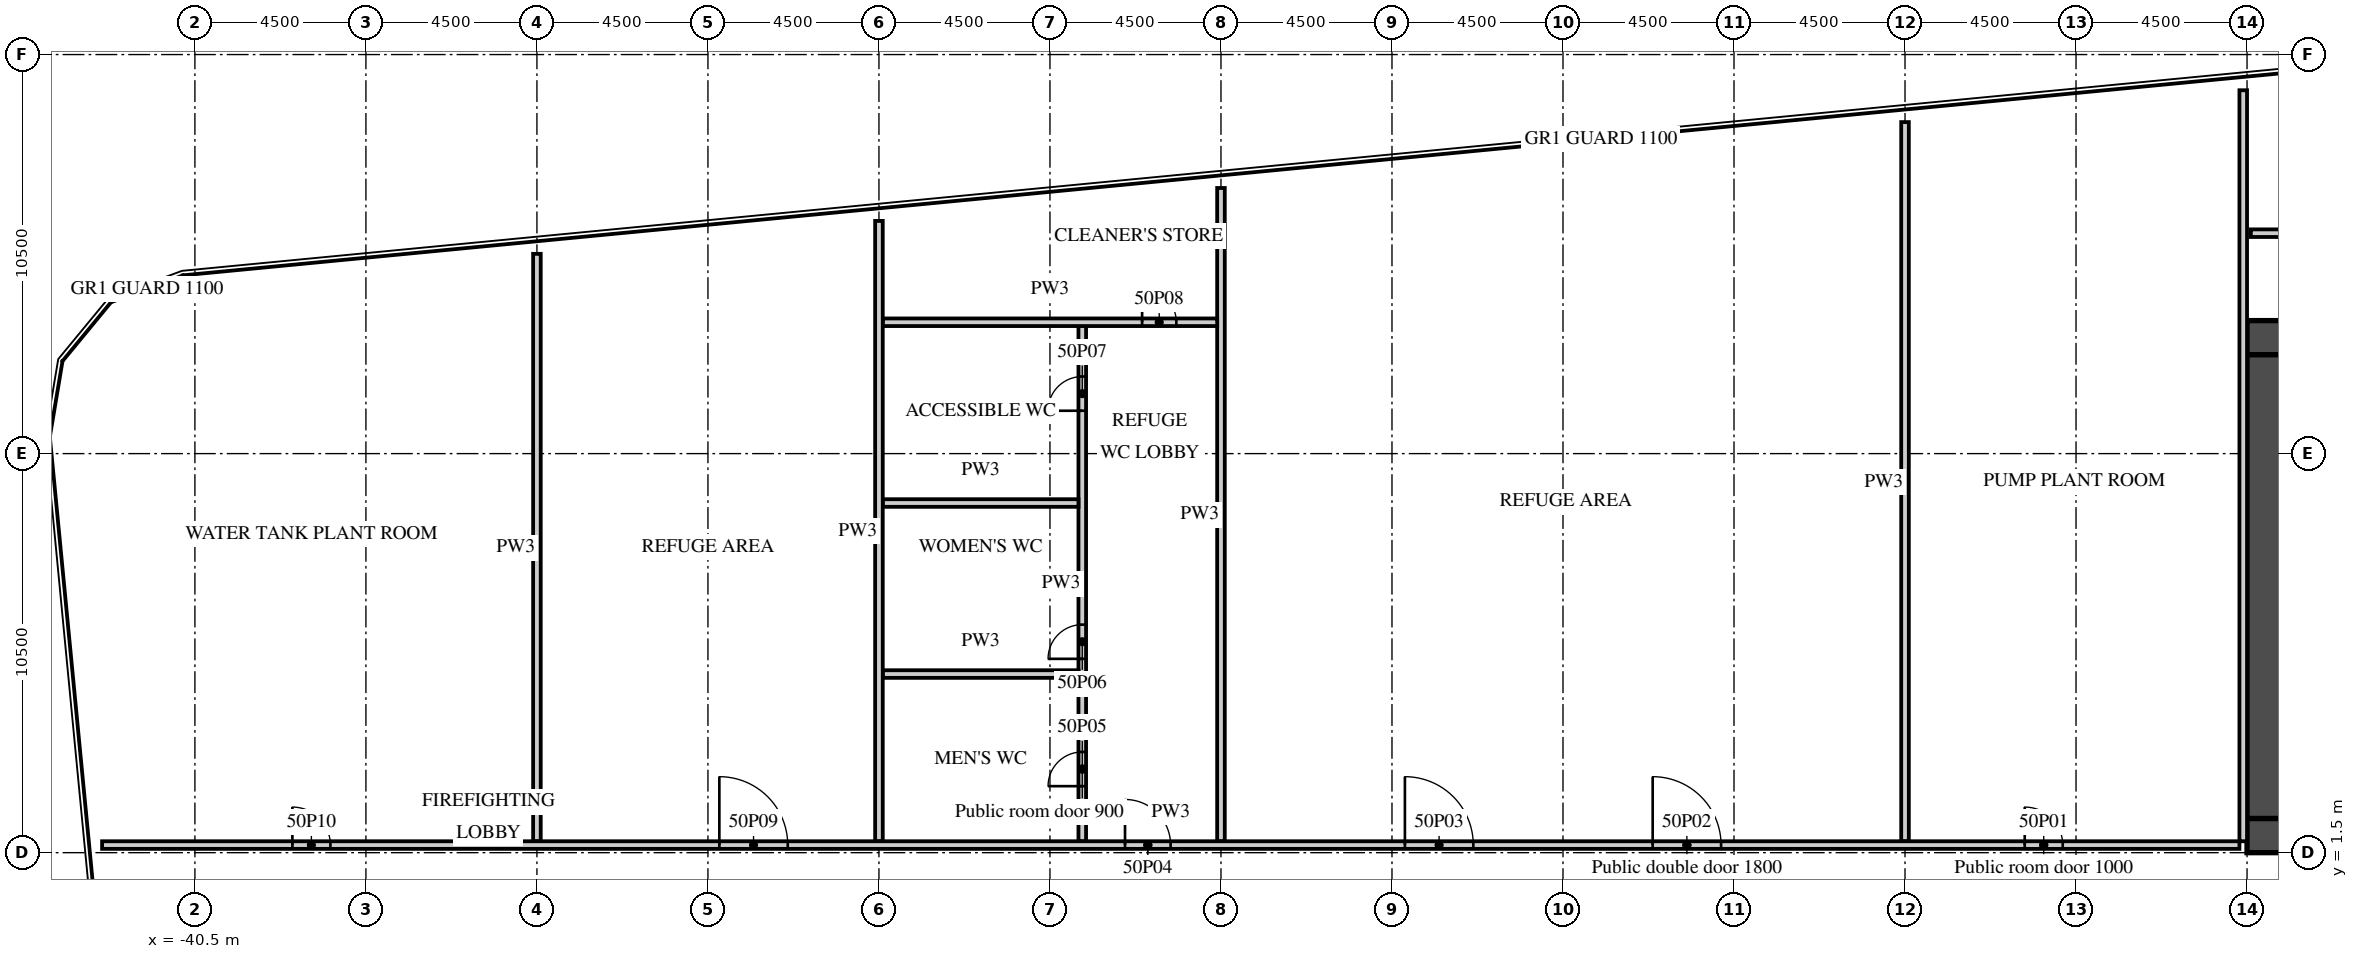
"""IFC4 building model, lengths in metres.
Left out: names, types, materials, properties, quantities, classifications, styles, units other than length and angle.
Written with IfcOpenShell. Run it as: python <this file> out.ifc"""

import sys

from ifc_helpers import new_model, si_unit, direction, frame, frame_2d, origin, place, context, subcontext, project, spatial, rectangle, extrude, element, fill, save


model = new_model("IFC4")
c1 = context("Model", 3, precision=1e-05, world=origin(), true_north=direction((0.0, 1.0)))
c2 = subcontext(c1, "Body", "Model", "MODEL_VIEW")
j1 = project(units=[si_unit("LENGTHUNIT", "METRE"), si_unit("PLANEANGLEUNIT", "RADIAN")], contexts=[c1])
p1 = place(None, origin())
s1 = spatial("IfcSite", under=j1, at=p1, CompositionType="ELEMENT")
p2 = place(p1, origin())
s2 = spatial("IfcBuilding", under=s1, at=p2, CompositionType="ELEMENT")
p3 = place(p2, frame((0.0, 0.0, 206.5)))
s3 = spatial("IfcBuildingStorey", under=s2, at=p3, CompositionType="ELEMENT", Elevation=206.5)
p4 = place(p3, frame((13.5, 1.95, 0.0), z_axis=(0.0, 0.0, 1.0), x_axis=(1.0, 0.0, 0.0)))
e1 = element("IfcWall", 1, at=p4, inside=s3, PredefinedType="SHEAR", context=c2, shape_type="SweptSolid", body=[
    extrude(rectangle(XDim=18.0, YDim=0.9, at=frame_2d((9.0, 0.0))), origin(), (0.0, 0.0, 1.0), 4.2),
])
p5 = place(p4, frame((1.475, 0.0, 0.0)))
e2 = element("IfcOpeningElement", 2, at=p5, cuts=e1, PredefinedType="OPENING", context=c2, shape_type="SweptSolid", body=[
    extrude(rectangle(XDim=1.8, YDim=2.1, at=frame_2d((0.9, 1.05))), frame((0.0, 0.46, 0.0), z_axis=(0.0, -1.0, 0.0), x_axis=(1.0, 0.0, 0.0)), (0.0, 0.0, 1.0), 0.92),
])
p6 = place(p3, frame((13.5, 15.05, 0.0), z_axis=(0.0, 0.0, 1.0), x_axis=(1.0, 0.0, 0.0)))
e3 = element("IfcWall", 3, at=p6, inside=s3, PredefinedType="SHEAR", context=c2, shape_type="SweptSolid", body=[
    extrude(rectangle(XDim=6.8, YDim=0.9, at=frame_2d((3.4, 0.0))), origin(), (0.0, 0.0, 1.0), 4.2),
])
p7 = place(p6, frame((4.725, 0.0, 0.0)))
e4 = element("IfcOpeningElement", 4, at=p7, cuts=e3, PredefinedType="OPENING", context=c2, shape_type="SweptSolid", body=[
    extrude(rectangle(XDim=1.2, YDim=2.1, at=frame_2d((0.6, 1.05))), frame((0.0, 0.46, 0.0), z_axis=(0.0, -1.0, 0.0), x_axis=(1.0, 0.0, 0.0)), (0.0, 0.0, 1.0), 0.92),
])
p8 = place(p3, frame((13.95, 2.4, 0.0), z_axis=(0.0, 0.0, 1.0), x_axis=(0.0, 1.0, 0.0)))
e5 = element("IfcWall", 5, at=p8, inside=s3, PredefinedType="SHEAR", context=c2, shape_type="SweptSolid", body=[
    extrude(rectangle(XDim=12.2, YDim=0.9, at=frame_2d((6.1, 0.0))), origin(), (0.0, 0.0, 1.0), 4.2),
])
p9 = place(p3, frame((13.6, 17.8, 0.0), z_axis=(0.0, 0.0, 1.0), x_axis=(1.0, 0.0, 0.0)))
e6 = element("IfcWall", 6, at=p9, inside=s3, PredefinedType="PARTITIONING", context=c2, shape_type="SweptSolid", body=[
    extrude(rectangle(XDim=24.378, YDim=0.2, at=frame_2d((12.189, 0.0))), origin(), (0.0, 0.0, 1.0), 4.2),
])
p10 = place(p9, frame((15.012, 0.0, 0.0)))
e7 = element("IfcOpeningElement", 7, at=p10, cuts=e6, PredefinedType="OPENING", context=c2, shape_type="SweptSolid", body=[
    extrude(rectangle(XDim=0.9, YDim=2.1, at=frame_2d((0.45, 1.05))), frame((0.0, 0.11, 0.0), z_axis=(0.0, -1.0, 0.0), x_axis=(1.0, 0.0, 0.0)), (0.0, 0.0, 1.0), 0.22),
])
p11 = place(p9, frame((6.712, 0.0, 0.0)))
e8 = element("IfcOpeningElement", 8, at=p11, cuts=e6, PredefinedType="OPENING", context=c2, shape_type="SweptSolid", body=[
    extrude(rectangle(XDim=0.9, YDim=2.1, at=frame_2d((0.45, 1.05))), frame((0.0, 0.11, 0.0), z_axis=(0.0, -1.0, 0.0), x_axis=(1.0, 0.0, 0.0)), (0.0, 0.0, 1.0), 0.22),
])
p12 = place(p3, frame((4.5, 1.8, 0.0), z_axis=(0.0, 0.0, 1.0), x_axis=(0.0, 1.0, 0.0)))
e9 = element("IfcWall", 9, at=p12, inside=s3, PredefinedType="PARTITIONING", context=c2, shape_type="SweptSolid", body=[
    extrude(rectangle(XDim=18.923, YDim=0.2, at=frame_2d((9.461, 0.0))), origin(), (0.0, 0.0, 1.0), 4.2),
])
p13 = place(p3, frame((-13.5, 1.8, 0.0), z_axis=(0.0, 0.0, 1.0), x_axis=(0.0, 1.0, 0.0)))
e10 = element("IfcWall", 10, at=p13, inside=s3, PredefinedType="PARTITIONING", context=c2, shape_type="SweptSolid", body=[
    extrude(rectangle(XDim=17.189, YDim=0.2, at=frame_2d((8.595, 0.0))), origin(), (0.0, 0.0, 1.0), 4.2),
])
p14 = place(p3, frame((-17.15, 1.8, 0.0), z_axis=(0.0, 0.0, 1.0), x_axis=(0.0, 1.0, 0.0)))
e11 = element("IfcWall", 11, at=p14, inside=s3, PredefinedType="PARTITIONING", context=c2, shape_type="SweptSolid", body=[
    extrude(rectangle(XDim=13.556, YDim=0.2, at=frame_2d((6.778, 0.0))), origin(), (0.0, 0.0, 1.0), 4.2),
])
p15 = place(p14, frame((1.45, 0.0, 0.0)))
e12 = element("IfcOpeningElement", 12, at=p15, cuts=e11, PredefinedType="OPENING", context=c2, shape_type="SweptSolid", body=[
    extrude(rectangle(XDim=0.9, YDim=2.1, at=frame_2d((0.45, 1.05))), frame((0.0, 0.11, 0.0), z_axis=(0.0, -1.0, 0.0), x_axis=(1.0, 0.0, 0.0)), (0.0, 0.0, 1.0), 0.22),
])
p16 = place(p14, frame((4.8, 0.0, 0.0)))
e13 = element("IfcOpeningElement", 13, at=p16, cuts=e11, PredefinedType="OPENING", context=c2, shape_type="SweptSolid", body=[
    extrude(rectangle(XDim=0.9, YDim=2.1, at=frame_2d((0.45, 1.05))), frame((0.0, 0.11, 0.0), z_axis=(0.0, -1.0, 0.0), x_axis=(1.0, 0.0, 0.0)), (0.0, 0.0, 1.0), 0.22),
])
p17 = place(p14, frame((11.328, 0.0, 0.0)))
e14 = element("IfcOpeningElement", 14, at=p17, cuts=e11, PredefinedType="OPENING", context=c2, shape_type="SweptSolid", body=[
    extrude(rectangle(XDim=0.9, YDim=2.1, at=frame_2d((0.45, 1.05))), frame((0.0, 0.11, 0.0), z_axis=(0.0, -1.0, 0.0), x_axis=(1.0, 0.0, 0.0)), (0.0, 0.0, 1.0), 0.22),
])
for number, where, z_axis, x_axis in (
    (15, (-22.4, 6.2, 0.0), (0.0, 0.0, 1.0), (1.0, 0.0, 0.0)),
    (16, (-22.4, 10.7, 0.0), (0.0, 0.0, 1.0), (1.0, 0.0, 0.0)),
):
    element("IfcWall", number, at=place(p3, frame(where, z_axis=z_axis, x_axis=x_axis)), inside=s3, PredefinedType="PARTITIONING", context=c2, shape_type="SweptSolid", body=[
        extrude(rectangle(XDim=5.15, YDim=0.2, at=frame_2d((2.575, 0.0))), origin(), (0.0, 0.0, 1.0), 4.2),
    ])
p18 = place(p3, frame((-22.4, 15.456, 0.0), z_axis=(0.0, 0.0, 1.0), x_axis=(1.0, 0.0, 0.0)))
e17 = element("IfcWall", 17, at=p18, inside=s3, PredefinedType="PARTITIONING", context=c2, shape_type="SweptSolid", body=[
    extrude(rectangle(XDim=8.8, YDim=0.2, at=frame_2d((4.4, 0.0))), origin(), (0.0, 0.0, 1.0), 4.2),
])
p19 = place(p18, frame((6.825, 0.0, 0.0)))
e18 = element("IfcOpeningElement", 18, at=p19, cuts=e17, PredefinedType="OPENING", context=c2, shape_type="SweptSolid", body=[
    extrude(rectangle(XDim=0.9, YDim=2.1, at=frame_2d((0.45, 1.05))), frame((0.0, 0.11, 0.0), z_axis=(0.0, -1.0, 0.0), x_axis=(1.0, 0.0, 0.0)), (0.0, 0.0, 1.0), 0.22),
])
p20 = place(p3, frame((-22.5, 1.8, 0.0), z_axis=(0.0, 0.0, 1.0), x_axis=(0.0, 1.0, 0.0)))
e19 = element("IfcWall", 19, at=p20, inside=s3, PredefinedType="PARTITIONING", context=c2, shape_type="SweptSolid", body=[
    extrude(rectangle(XDim=16.323, YDim=0.2, at=frame_2d((8.162, 0.0))), origin(), (0.0, 0.0, 1.0), 4.2),
])
p21 = place(p3, frame((-31.5, 1.8, 0.0), z_axis=(0.0, 0.0, 1.0), x_axis=(0.0, 1.0, 0.0)))
e20 = element("IfcWall", 20, at=p21, inside=s3, PredefinedType="PARTITIONING", context=c2, shape_type="SweptSolid", body=[
    extrude(rectangle(XDim=15.456, YDim=0.2, at=frame_2d((7.728, 0.0))), origin(), (0.0, 0.0, 1.0), 4.2),
])
p22 = place(p3, frame((-42.942, 1.7, 0.0), z_axis=(0.0, 0.0, 1.0), x_axis=(1.0, 0.0, 0.0)))
e21 = element("IfcWall", 21, at=p22, inside=s3, PredefinedType="PARTITIONING", context=c2, shape_type="SweptSolid", body=[
    extrude(rectangle(XDim=56.242, YDim=0.2, at=frame_2d((28.121, 0.0))), origin(), (0.0, 0.0, 1.0), 4.2),
])
p23 = place(p22, frame((50.592, 0.0, 0.0)))
e22 = element("IfcOpeningElement", 22, at=p23, cuts=e21, PredefinedType="OPENING", context=c2, shape_type="SweptSolid", body=[
    extrude(rectangle(XDim=1.0, YDim=2.1, at=frame_2d((0.5, 1.05))), frame((0.0, 0.11, 0.0), z_axis=(0.0, -1.0, 0.0), x_axis=(1.0, 0.0, 0.0)), (0.0, 0.0, 1.0), 0.22),
])
p24 = place(p22, frame((40.802, 0.0, 0.0)))
e23 = element("IfcOpeningElement", 23, at=p24, cuts=e21, PredefinedType="OPENING", context=c2, shape_type="SweptSolid", body=[
    extrude(rectangle(XDim=1.8, YDim=2.1, at=frame_2d((0.9, 1.05))), frame((0.0, 0.11, 0.0), z_axis=(0.0, -1.0, 0.0), x_axis=(1.0, 0.0, 0.0)), (0.0, 0.0, 1.0), 0.22),
])
p25 = place(p22, frame((34.282, 0.0, 0.0)))
e24 = element("IfcOpeningElement", 24, at=p25, cuts=e21, PredefinedType="OPENING", context=c2, shape_type="SweptSolid", body=[
    extrude(rectangle(XDim=1.8, YDim=2.1, at=frame_2d((0.9, 1.05))), frame((0.0, 0.11, 0.0), z_axis=(0.0, -1.0, 0.0), x_axis=(1.0, 0.0, 0.0)), (0.0, 0.0, 1.0), 0.22),
])
p26 = place(p22, frame((26.917, 0.0, 0.0)))
e25 = element("IfcOpeningElement", 25, at=p26, cuts=e21, PredefinedType="OPENING", context=c2, shape_type="SweptSolid", body=[
    extrude(rectangle(XDim=1.2, YDim=2.1, at=frame_2d((0.6, 1.05))), frame((0.0, 0.11, 0.0), z_axis=(0.0, -1.0, 0.0), x_axis=(1.0, 0.0, 0.0)), (0.0, 0.0, 1.0), 0.22),
])
p27 = place(p22, frame((16.242, 0.0, 0.0)))
e26 = element("IfcOpeningElement", 26, at=p27, cuts=e21, PredefinedType="OPENING", context=c2, shape_type="SweptSolid", body=[
    extrude(rectangle(XDim=1.8, YDim=2.1, at=frame_2d((0.9, 1.05))), frame((0.0, 0.11, 0.0), z_axis=(0.0, -1.0, 0.0), x_axis=(1.0, 0.0, 0.0)), (0.0, 0.0, 1.0), 0.22),
])
p28 = place(p22, frame((5.007, 0.0, 0.0)))
e27 = element("IfcOpeningElement", 27, at=p28, cuts=e21, PredefinedType="OPENING", context=c2, shape_type="SweptSolid", body=[
    extrude(rectangle(XDim=1.0, YDim=2.1, at=frame_2d((0.5, 1.05))), frame((0.0, 0.11, 0.0), z_axis=(0.0, -1.0, 0.0), x_axis=(1.0, 0.0, 0.0)), (0.0, 0.0, 1.0), 0.22),
])
p29 = place(p3, frame((13.4, 1.8, 0.0), z_axis=(0.0, 0.0, 1.0), x_axis=(0.0, 1.0, 0.0)))
e28 = element("IfcWall", 28, at=p29, inside=s3, PredefinedType="PARTITIONING", context=c2, shape_type="SweptSolid", body=[
    extrude(rectangle(XDim=19.76, YDim=0.2, at=frame_2d((9.88, 0.0))), origin(), (0.0, 0.0, 1.0), 4.2),
])
p30 = place(p23, origin())
e29 = element("IfcDoor", 29, at=p30, inside=s3, OperationType="SINGLE_SWING_LEFT", PredefinedType="DOOR", context=c2, shape_type="SweptSolid", body=[
    extrude(rectangle(XDim=1.0, YDim=2.1, at=frame_2d((0.5, 1.05))), frame((0.0, 0.025, 0.0), z_axis=(0.0, -1.0, 0.0), x_axis=(1.0, 0.0, 0.0)), (0.0, 0.0, 1.0), 0.05),
])
fill(e22, e29)
p31 = place(p24, origin())
e30 = element("IfcDoor", 30, at=p31, inside=s3, OperationType="DOUBLE_DOOR_DOUBLE_SWING", PredefinedType="DOOR", context=c2, shape_type="SweptSolid", body=[
    extrude(rectangle(XDim=1.8, YDim=2.1, at=frame_2d((0.9, 1.05))), frame((0.0, 0.025, 0.0), z_axis=(0.0, -1.0, 0.0), x_axis=(1.0, 0.0, 0.0)), (0.0, 0.0, 1.0), 0.05),
])
fill(e23, e30)
p32 = place(p25, origin())
e31 = element("IfcDoor", 31, at=p32, inside=s3, OperationType="DOUBLE_DOOR_DOUBLE_SWING", PredefinedType="DOOR", context=c2, shape_type="SweptSolid", body=[
    extrude(rectangle(XDim=1.8, YDim=2.1, at=frame_2d((0.9, 1.05))), frame((0.0, 0.025, 0.0), z_axis=(0.0, -1.0, 0.0), x_axis=(1.0, 0.0, 0.0)), (0.0, 0.0, 1.0), 0.05),
])
fill(e24, e31)
p33 = place(p26, origin())
e32 = element("IfcDoor", 32, at=p33, inside=s3, OperationType="SINGLE_SWING_LEFT", PredefinedType="DOOR", context=c2, shape_type="SweptSolid", body=[
    extrude(rectangle(XDim=1.2, YDim=2.1, at=frame_2d((0.6, 1.05))), frame((0.0, 0.025, 0.0), z_axis=(0.0, -1.0, 0.0), x_axis=(1.0, 0.0, 0.0)), (0.0, 0.0, 1.0), 0.05),
])
fill(e25, e32)
p34 = place(p15, origin())
e33 = element("IfcDoor", 33, at=p34, inside=s3, OperationType="SINGLE_SWING_LEFT", PredefinedType="DOOR", context=c2, shape_type="SweptSolid", body=[
    extrude(rectangle(XDim=0.9, YDim=2.1, at=frame_2d((0.45, 1.05))), frame((0.0, 0.025, 0.0), z_axis=(0.0, -1.0, 0.0), x_axis=(1.0, 0.0, 0.0)), (0.0, 0.0, 1.0), 0.05),
])
fill(e12, e33)
p35 = place(p16, origin())
e34 = element("IfcDoor", 34, at=p35, inside=s3, OperationType="SINGLE_SWING_LEFT", PredefinedType="DOOR", context=c2, shape_type="SweptSolid", body=[
    extrude(rectangle(XDim=0.9, YDim=2.1, at=frame_2d((0.45, 1.05))), frame((0.0, 0.025, 0.0), z_axis=(0.0, -1.0, 0.0), x_axis=(1.0, 0.0, 0.0)), (0.0, 0.0, 1.0), 0.05),
])
fill(e13, e34)
p36 = place(p17, origin())
e35 = element("IfcDoor", 35, at=p36, inside=s3, OperationType="SINGLE_SWING_LEFT", PredefinedType="DOOR", context=c2, shape_type="SweptSolid", body=[
    extrude(rectangle(XDim=0.9, YDim=2.1, at=frame_2d((0.45, 1.05))), frame((0.0, 0.025, 0.0), z_axis=(0.0, -1.0, 0.0), x_axis=(1.0, 0.0, 0.0)), (0.0, 0.0, 1.0), 0.05),
])
fill(e14, e35)
p37 = place(p19, origin())
e36 = element("IfcDoor", 36, at=p37, inside=s3, OperationType="SINGLE_SWING_LEFT", PredefinedType="DOOR", context=c2, shape_type="SweptSolid", body=[
    extrude(rectangle(XDim=0.9, YDim=2.1, at=frame_2d((0.45, 1.05))), frame((0.0, 0.025, 0.0), z_axis=(0.0, -1.0, 0.0), x_axis=(1.0, 0.0, 0.0)), (0.0, 0.0, 1.0), 0.05),
])
fill(e18, e36)
p38 = place(p27, origin())
e37 = element("IfcDoor", 37, at=p38, inside=s3, OperationType="DOUBLE_DOOR_DOUBLE_SWING", PredefinedType="DOOR", context=c2, shape_type="SweptSolid", body=[
    extrude(rectangle(XDim=1.8, YDim=2.1, at=frame_2d((0.9, 1.05))), frame((0.0, 0.025, 0.0), z_axis=(0.0, -1.0, 0.0), x_axis=(1.0, 0.0, 0.0)), (0.0, 0.0, 1.0), 0.05),
])
fill(e26, e37)
p39 = place(p28, origin())
e38 = element("IfcDoor", 38, at=p39, inside=s3, OperationType="SINGLE_SWING_LEFT", PredefinedType="DOOR", context=c2, shape_type="SweptSolid", body=[
    extrude(rectangle(XDim=1.0, YDim=2.1, at=frame_2d((0.5, 1.05))), frame((0.0, 0.025, 0.0), z_axis=(0.0, -1.0, 0.0), x_axis=(1.0, 0.0, 0.0)), (0.0, 0.0, 1.0), 0.05),
])
fill(e27, e38)
save(model, sys.argv[1])
